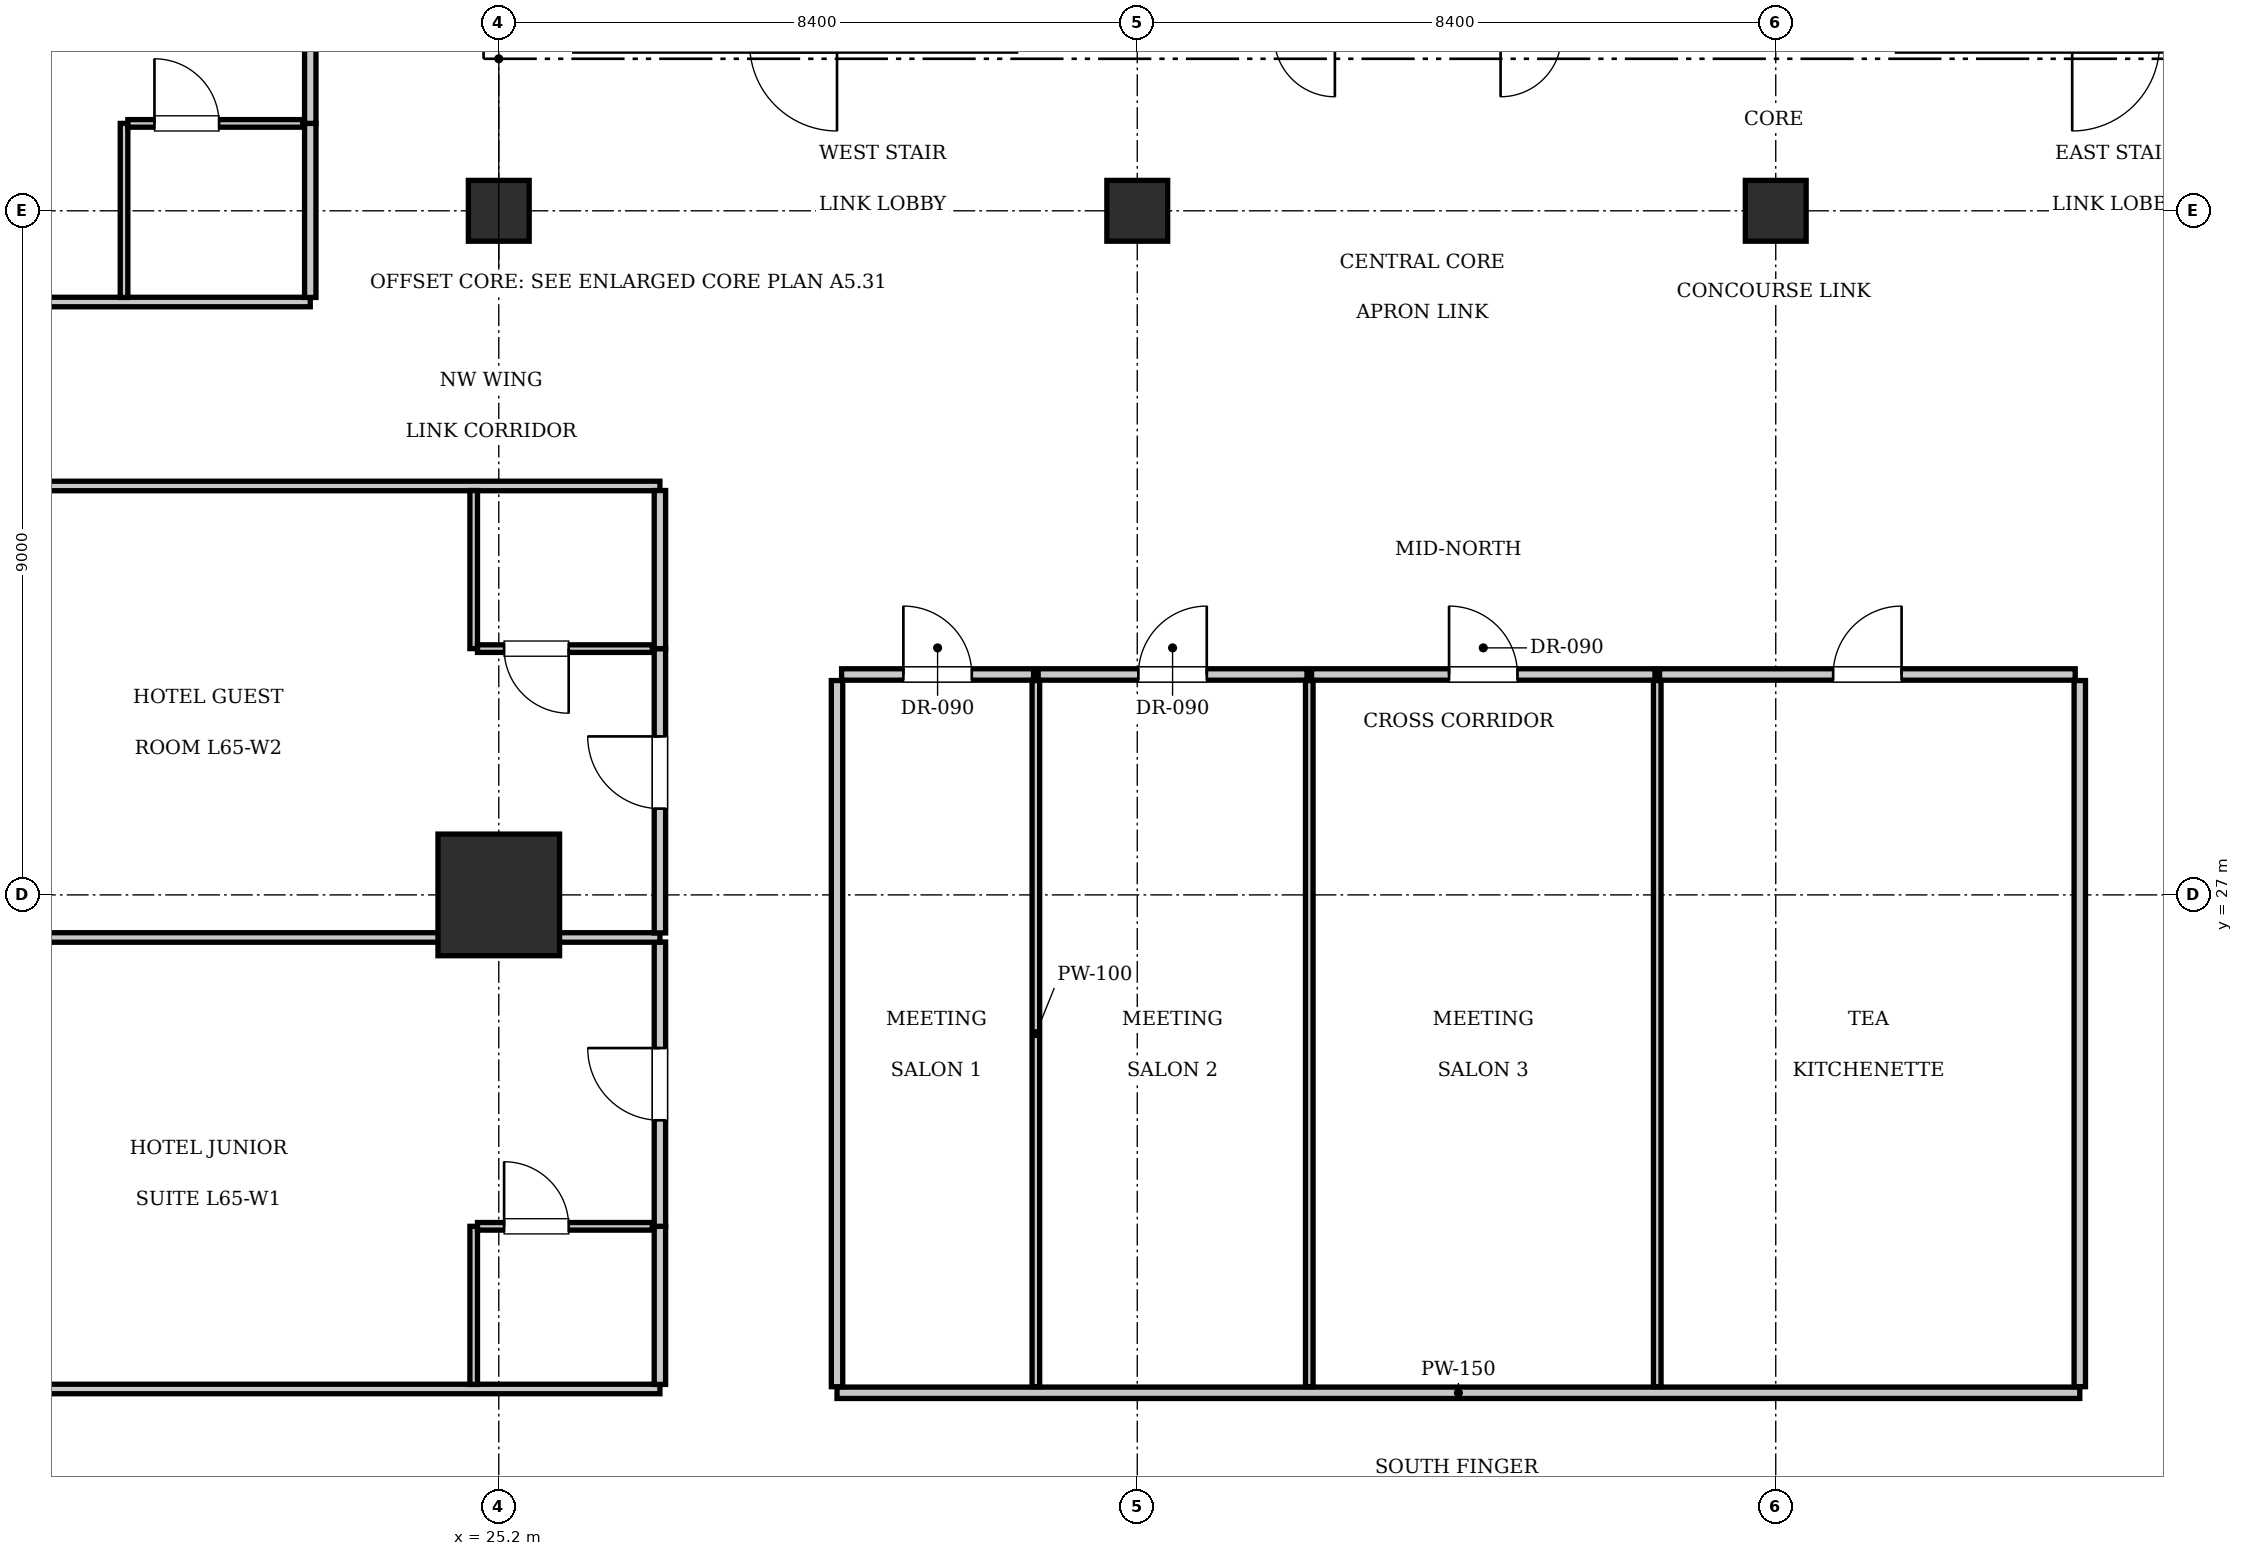
"""IFC4 building model, lengths in metres.
Left out: names, types, materials, properties, quantities, classifications, styles, units other than length and angle.
Written with IfcOpenShell. Run it as: python <this file> out.ifc"""

import sys

from ifc_helpers import new_model, si_unit, direction, frame, frame_2d, origin, origin_2d, place, context, subcontext, project, spatial, rectangle, extrude, element, fill, save


model = new_model("IFC4")
c1 = context("Model", 3, precision=1e-05, world=origin(), true_north=direction((0.0, 1.0)))
c2 = subcontext(c1, "Body", "Model", "MODEL_VIEW")
j1 = project(units=[si_unit("LENGTHUNIT", "METRE"), si_unit("PLANEANGLEUNIT", "RADIAN")], contexts=[c1])
p1 = place(None, origin())
s1 = spatial("IfcSite", under=j1, at=p1, CompositionType="ELEMENT")
p2 = place(p1, origin())
s2 = spatial("IfcBuilding", under=s1, at=p2, CompositionType="ELEMENT")
p3 = place(p2, frame((0.0, 0.0, 266.35)))
s3 = spatial("IfcBuildingStorey", under=s2, at=p3, CompositionType="ELEMENT", Elevation=266.35)
p4 = place(p3, frame((25.2, 27.0, 0.0), z_axis=(0.0, 0.0, 1.0), x_axis=(1.0, 0.0, 0.0)))
e1 = element("IfcColumn", 1, at=p4, inside=s3, PredefinedType="COLUMN", context=c2, shape_type="SweptSolid", body=[
    extrude(rectangle(XDim=1.6, YDim=1.6, at=origin_2d()), origin(), (0.0, 0.0, 1.0), 3.85),
])
for number, where, z_axis, x_axis in (
    (2, (25.2, 36.0, 0.0), (0.0, 0.0, 1.0), (1.0, 0.0, 0.0)),
    (3, (33.6, 36.0, 0.0), (0.0, 0.0, 1.0), (1.0, 0.0, 0.0)),
    (4, (42.0, 36.0, 0.0), (0.0, 0.0, 1.0), (1.0, 0.0, 0.0)),
):
    element("IfcColumn", number, at=place(p3, frame(where, z_axis=z_axis, x_axis=x_axis)), inside=s3, PredefinedType="COLUMN", context=c2, shape_type="SweptSolid", body=[
        extrude(rectangle(XDim=0.8, YDim=0.8, at=origin_2d()), origin(), (0.0, 0.0, 1.0), 3.85),
    ])
p5 = place(p3, frame((29.65, 20.45, 0.0), z_axis=(0.0, 0.0, 1.0), x_axis=(1.0, 0.0, 0.0)))
e5 = element("IfcWall", 5, at=p5, inside=s3, PredefinedType="PARTITIONING", context=c2, shape_type="SweptSolid", body=[
    extrude(rectangle(XDim=16.35, YDim=0.15, at=frame_2d((8.175, 0.0))), origin(), (0.0, 0.0, 1.0), 3.61),
])
for number, where, z_axis, x_axis in (
    (6, (29.65, 20.53, 0.0), (0.0, 0.0, 1.0), (0.0, 1.0, 0.0)),
    (7, (46.0, 20.53, 0.0), (0.0, 0.0, 1.0), (0.0, 1.0, 0.0)),
):
    element("IfcWall", number, at=place(p3, frame(where, z_axis=z_axis, x_axis=x_axis)), inside=s3, PredefinedType="PARTITIONING", context=c2, shape_type="SweptSolid", body=[
        extrude(rectangle(XDim=9.29, YDim=0.15, at=frame_2d((4.645, 0.0))), origin(), (0.0, 0.0, 1.0), 3.61),
    ])
p6 = place(p3, frame((29.71, 29.9, 0.0), z_axis=(0.0, 0.0, 1.0), x_axis=(1.0, 0.0, 0.0)))
e8 = element("IfcWall", 8, at=p6, inside=s3, PredefinedType="PARTITIONING", context=c2, shape_type="SweptSolid", body=[
    extrude(rectangle(XDim=2.526, YDim=0.15, at=frame_2d((1.263, 0.0))), origin(), (0.0, 0.0, 1.0), 3.61),
])
p7 = place(p6, frame((0.813, 0.0, 0.0)))
e9 = element("IfcOpeningElement", 9, at=p7, cuts=e8, PredefinedType="OPENING", context=c2, shape_type="SweptSolid", body=[
    extrude(rectangle(XDim=0.9, YDim=2.1, at=frame_2d((0.45, 1.05))), frame((0.0, 0.085, 0.0), z_axis=(0.0, -1.0, 0.0), x_axis=(1.0, 0.0, 0.0)), (0.0, 0.0, 1.0), 0.17),
])
p8 = place(p3, frame((32.266, 20.53, 0.0), z_axis=(0.0, 0.0, 1.0), x_axis=(0.0, 1.0, 0.0)))
e10 = element("IfcWall", 10, at=p8, inside=s3, PredefinedType="PARTITIONING", context=c2, shape_type="SweptSolid", body=[
    extrude(rectangle(XDim=9.29, YDim=0.1, at=frame_2d((4.645, 0.0))), origin(), (0.0, 0.0, 1.0), 3.61),
])
p9 = place(p3, frame((32.296, 29.9, 0.0), z_axis=(0.0, 0.0, 1.0), x_axis=(1.0, 0.0, 0.0)))
e11 = element("IfcWall", 11, at=p9, inside=s3, PredefinedType="PARTITIONING", context=c2, shape_type="SweptSolid", body=[
    extrude(rectangle(XDim=3.537, YDim=0.15, at=frame_2d((1.769, 0.0))), origin(), (0.0, 0.0, 1.0), 3.61),
])
p10 = place(p9, frame((1.319, 0.0, 0.0)))
e12 = element("IfcOpeningElement", 12, at=p10, cuts=e11, PredefinedType="OPENING", context=c2, shape_type="SweptSolid", body=[
    extrude(rectangle(XDim=0.9, YDim=2.1, at=frame_2d((0.45, 1.05))), frame((0.0, 0.085, 0.0), z_axis=(0.0, -1.0, 0.0), x_axis=(1.0, 0.0, 0.0)), (0.0, 0.0, 1.0), 0.17),
])
p11 = place(p3, frame((35.863, 20.53, 0.0), z_axis=(0.0, 0.0, 1.0), x_axis=(0.0, 1.0, 0.0)))
e13 = element("IfcWall", 13, at=p11, inside=s3, PredefinedType="PARTITIONING", context=c2, shape_type="SweptSolid", body=[
    extrude(rectangle(XDim=9.29, YDim=0.1, at=frame_2d((4.645, 0.0))), origin(), (0.0, 0.0, 1.0), 3.61),
])
p12 = place(p3, frame((35.893, 29.9, 0.0), z_axis=(0.0, 0.0, 1.0), x_axis=(1.0, 0.0, 0.0)))
e14 = element("IfcWall", 14, at=p12, inside=s3, PredefinedType="PARTITIONING", context=c2, shape_type="SweptSolid", body=[
    extrude(rectangle(XDim=4.518, YDim=0.15, at=frame_2d((2.259, 0.0))), origin(), (0.0, 0.0, 1.0), 3.61),
])
p13 = place(p12, frame((1.809, 0.0, 0.0)))
e15 = element("IfcOpeningElement", 15, at=p13, cuts=e14, PredefinedType="OPENING", context=c2, shape_type="SweptSolid", body=[
    extrude(rectangle(XDim=0.9, YDim=2.1, at=frame_2d((0.45, 1.05))), frame((0.0, 0.085, 0.0), z_axis=(0.0, -1.0, 0.0), x_axis=(1.0, 0.0, 0.0)), (0.0, 0.0, 1.0), 0.17),
])
p14 = place(p3, frame((40.441, 20.53, 0.0), z_axis=(0.0, 0.0, 1.0), x_axis=(0.0, 1.0, 0.0)))
e16 = element("IfcWall", 16, at=p14, inside=s3, PredefinedType="PARTITIONING", context=c2, shape_type="SweptSolid", body=[
    extrude(rectangle(XDim=9.29, YDim=0.1, at=frame_2d((4.645, 0.0))), origin(), (0.0, 0.0, 1.0), 3.61),
])
p15 = place(p3, frame((40.471, 29.9, 0.0), z_axis=(0.0, 0.0, 1.0), x_axis=(1.0, 0.0, 0.0)))
e17 = element("IfcWall", 17, at=p15, inside=s3, PredefinedType="PARTITIONING", context=c2, shape_type="SweptSolid", body=[
    extrude(rectangle(XDim=5.469, YDim=0.15, at=frame_2d((2.734, 0.0))), origin(), (0.0, 0.0, 1.0), 3.61),
])
p16 = place(p15, frame((2.284, 0.0, 0.0)))
e18 = element("IfcOpeningElement", 18, at=p16, cuts=e17, PredefinedType="OPENING", context=c2, shape_type="SweptSolid", body=[
    extrude(rectangle(XDim=0.9, YDim=2.1, at=frame_2d((0.45, 1.05))), frame((0.0, 0.085, 0.0), z_axis=(0.0, -1.0, 0.0), x_axis=(1.0, 0.0, 0.0)), (0.0, 0.0, 1.0), 0.17),
])
for number, where, z_axis, x_axis in (
    (19, (15.5, 20.5, 0.0), (0.0, 0.0, 1.0), (1.0, 0.0, 0.0)),
    (20, (15.5, 32.38, 0.0), (0.0, 0.0, 1.0), (1.0, 0.0, 0.0)),
):
    element("IfcWall", number, at=place(p3, frame(where, z_axis=z_axis, x_axis=x_axis)), inside=s3, PredefinedType="PARTITIONING", context=c2, shape_type="SweptSolid", body=[
        extrude(rectangle(XDim=11.82, YDim=0.125, at=frame_2d((5.91, 0.0))), origin(), (0.0, 0.0, 1.0), 3.61),
    ])
p17 = place(p3, frame((27.32, 20.56, 0.0), z_axis=(0.0, 0.0, 1.0), x_axis=(0.0, 1.0, 0.0)))
e21 = element("IfcWall", 21, at=p17, inside=s3, PredefinedType="PARTITIONING", context=c2, shape_type="SweptSolid", body=[
    extrude(rectangle(XDim=2.08, YDim=0.15, at=frame_2d((1.04, 0.0))), origin(), (0.0, 0.0, 1.0), 3.61),
])
p18 = place(p3, frame((27.32, 22.64, 0.0), z_axis=(0.0, 0.0, 1.0), x_axis=(0.0, 1.0, 0.0)))
e22 = element("IfcWall", 22, at=p18, inside=s3, PredefinedType="PARTITIONING", context=c2, shape_type="SweptSolid", body=[
    extrude(rectangle(XDim=3.74, YDim=0.15, at=frame_2d((1.87, 0.0))), origin(), (0.0, 0.0, 1.0), 3.61),
])
p19 = place(p18, frame((1.395, 0.0, 0.0)))
e23 = element("IfcOpeningElement", 23, at=p19, cuts=e22, PredefinedType="OPENING", context=c2, shape_type="SweptSolid", body=[
    extrude(rectangle(XDim=0.95, YDim=2.15, at=frame_2d((0.475, 1.075))), frame((0.0, 0.085, 0.0), z_axis=(0.0, -1.0, 0.0), x_axis=(1.0, 0.0, 0.0)), (0.0, 0.0, 1.0), 0.17),
])
p20 = place(p3, frame((24.87, 20.56, 0.0), z_axis=(0.0, 0.0, 1.0), x_axis=(0.0, 1.0, 0.0)))
e24 = element("IfcWall", 24, at=p20, inside=s3, PredefinedType="PARTITIONING", context=c2, shape_type="SweptSolid", body=[
    extrude(rectangle(XDim=2.08, YDim=0.1, at=frame_2d((1.04, 0.0))), origin(), (0.0, 0.0, 1.0), 3.61),
])
p21 = place(p3, frame((24.92, 22.64, 0.0), z_axis=(0.0, 0.0, 1.0), x_axis=(1.0, 0.0, 0.0)))
e25 = element("IfcWall", 25, at=p21, inside=s3, PredefinedType="PARTITIONING", context=c2, shape_type="SweptSolid", body=[
    extrude(rectangle(XDim=2.3, YDim=0.1, at=frame_2d((1.15, 0.0))), origin(), (0.0, 0.0, 1.0), 3.61),
])
p22 = place(p21, frame((0.35, 0.0, 0.0)))
e26 = element("IfcOpeningElement", 26, at=p22, cuts=e25, PredefinedType="OPENING", context=c2, shape_type="SweptSolid", body=[
    extrude(rectangle(XDim=0.85, YDim=2.1, at=frame_2d((0.425, 1.05))), frame((0.0, 0.06, 0.0), z_axis=(0.0, -1.0, 0.0), x_axis=(1.0, 0.0, 0.0)), (0.0, 0.0, 1.0), 0.12),
])
p23 = place(p3, frame((15.5, 26.44, 0.0), z_axis=(0.0, 0.0, 1.0), x_axis=(1.0, 0.0, 0.0)))
e27 = element("IfcWall", 27, at=p23, inside=s3, PredefinedType="PARTITIONING", context=c2, shape_type="SweptSolid", body=[
    extrude(rectangle(XDim=11.82, YDim=0.125, at=frame_2d((5.91, 0.0))), origin(), (0.0, 0.0, 1.0), 3.61),
])
p24 = place(p3, frame((27.32, 26.5, 0.0), z_axis=(0.0, 0.0, 1.0), x_axis=(0.0, 1.0, 0.0)))
e28 = element("IfcWall", 28, at=p24, inside=s3, PredefinedType="PARTITIONING", context=c2, shape_type="SweptSolid", body=[
    extrude(rectangle(XDim=3.74, YDim=0.15, at=frame_2d((1.87, 0.0))), origin(), (0.0, 0.0, 1.0), 3.61),
])
p25 = place(p24, frame((1.635, 0.0, 0.0)))
e29 = element("IfcOpeningElement", 29, at=p25, cuts=e28, PredefinedType="OPENING", context=c2, shape_type="SweptSolid", body=[
    extrude(rectangle(XDim=0.95, YDim=2.15, at=frame_2d((0.475, 1.075))), frame((0.0, 0.085, 0.0), z_axis=(0.0, -1.0, 0.0), x_axis=(1.0, 0.0, 0.0)), (0.0, 0.0, 1.0), 0.17),
])
p26 = place(p3, frame((27.32, 30.24, 0.0), z_axis=(0.0, 0.0, 1.0), x_axis=(0.0, 1.0, 0.0)))
e30 = element("IfcWall", 30, at=p26, inside=s3, PredefinedType="PARTITIONING", context=c2, shape_type="SweptSolid", body=[
    extrude(rectangle(XDim=2.08, YDim=0.15, at=frame_2d((1.04, 0.0))), origin(), (0.0, 0.0, 1.0), 3.61),
])
p27 = place(p3, frame((24.87, 30.24, 0.0), z_axis=(0.0, 0.0, 1.0), x_axis=(0.0, 1.0, 0.0)))
e31 = element("IfcWall", 31, at=p27, inside=s3, PredefinedType="PARTITIONING", context=c2, shape_type="SweptSolid", body=[
    extrude(rectangle(XDim=2.08, YDim=0.1, at=frame_2d((1.04, 0.0))), origin(), (0.0, 0.0, 1.0), 3.61),
])
p28 = place(p3, frame((24.92, 30.24, 0.0), z_axis=(0.0, 0.0, 1.0), x_axis=(1.0, 0.0, 0.0)))
e32 = element("IfcWall", 32, at=p28, inside=s3, PredefinedType="PARTITIONING", context=c2, shape_type="SweptSolid", body=[
    extrude(rectangle(XDim=2.3, YDim=0.1, at=frame_2d((1.15, 0.0))), origin(), (0.0, 0.0, 1.0), 3.61),
])
p29 = place(p28, frame((0.35, 0.0, 0.0)))
e33 = element("IfcOpeningElement", 33, at=p29, cuts=e32, PredefinedType="OPENING", context=c2, shape_type="SweptSolid", body=[
    extrude(rectangle(XDim=0.85, YDim=2.1, at=frame_2d((0.425, 1.05))), frame((0.0, 0.06, 0.0), z_axis=(0.0, -1.0, 0.0), x_axis=(1.0, 0.0, 0.0)), (0.0, 0.0, 1.0), 0.12),
])
p30 = place(p3, frame((15.5, 34.8, 0.0), z_axis=(0.0, 0.0, 1.0), x_axis=(1.0, 0.0, 0.0)))
e34 = element("IfcWall", 34, at=p30, inside=s3, PredefinedType="PARTITIONING", context=c2, shape_type="SweptSolid", body=[
    extrude(rectangle(XDim=7.22, YDim=0.125, at=frame_2d((3.61, 0.0))), origin(), (0.0, 0.0, 1.0), 3.61),
])
p31 = place(p3, frame((22.72, 34.86, 0.0), z_axis=(0.0, 0.0, 1.0), x_axis=(0.0, 1.0, 0.0)))
e35 = element("IfcWall", 35, at=p31, inside=s3, PredefinedType="PARTITIONING", context=c2, shape_type="SweptSolid", body=[
    extrude(rectangle(XDim=2.29, YDim=0.15, at=frame_2d((1.145, 0.0))), origin(), (0.0, 0.0, 1.0), 3.61),
])
p32 = place(p3, frame((22.72, 37.15, 0.0), z_axis=(0.0, 0.0, 1.0), x_axis=(0.0, 1.0, 0.0)))
e36 = element("IfcWall", 36, at=p32, inside=s3, PredefinedType="PARTITIONING", context=c2, shape_type="SweptSolid", body=[
    extrude(rectangle(XDim=4.559, YDim=0.15, at=frame_2d((2.279, 0.0))), origin(), (0.0, 0.0, 1.0), 3.61),
])
p33 = place(p32, frame((1.804, 0.0, 0.0)))
e37 = element("IfcOpeningElement", 37, at=p33, cuts=e36, PredefinedType="OPENING", context=c2, shape_type="SweptSolid", body=[
    extrude(rectangle(XDim=0.95, YDim=2.15, at=frame_2d((0.475, 1.075))), frame((0.0, 0.085, 0.0), z_axis=(0.0, -1.0, 0.0), x_axis=(1.0, 0.0, 0.0)), (0.0, 0.0, 1.0), 0.17),
])
p34 = place(p3, frame((20.27, 34.86, 0.0), z_axis=(0.0, 0.0, 1.0), x_axis=(0.0, 1.0, 0.0)))
e38 = element("IfcWall", 38, at=p34, inside=s3, PredefinedType="PARTITIONING", context=c2, shape_type="SweptSolid", body=[
    extrude(rectangle(XDim=2.29, YDim=0.1, at=frame_2d((1.145, 0.0))), origin(), (0.0, 0.0, 1.0), 3.61),
])
p35 = place(p3, frame((20.32, 37.15, 0.0), z_axis=(0.0, 0.0, 1.0), x_axis=(1.0, 0.0, 0.0)))
e39 = element("IfcWall", 39, at=p35, inside=s3, PredefinedType="PARTITIONING", context=c2, shape_type="SweptSolid", body=[
    extrude(rectangle(XDim=2.3, YDim=0.1, at=frame_2d((1.15, 0.0))), origin(), (0.0, 0.0, 1.0), 3.61),
])
p36 = place(p35, frame((0.35, 0.0, 0.0)))
e40 = element("IfcOpeningElement", 40, at=p36, cuts=e39, PredefinedType="OPENING", context=c2, shape_type="SweptSolid", body=[
    extrude(rectangle(XDim=0.85, YDim=2.1, at=frame_2d((0.425, 1.05))), frame((0.0, 0.06, 0.0), z_axis=(0.0, -1.0, 0.0), x_axis=(1.0, 0.0, 0.0)), (0.0, 0.0, 1.0), 0.12),
])
p37 = place(p7, origin())
e41 = element("IfcDoor", 41, at=p37, inside=s3, OperationType="SINGLE_SWING_LEFT", PredefinedType="DOOR", context=c2, shape_type="SweptSolid", body=[
    extrude(rectangle(XDim=0.9, YDim=2.1, at=frame_2d((0.45, 1.05))), frame((0.0, 0.025, 0.0), z_axis=(0.0, -1.0, 0.0), x_axis=(1.0, 0.0, 0.0)), (0.0, 0.0, 1.0), 0.05),
])
fill(e9, e41)
p38 = place(p10, origin())
e42 = element("IfcDoor", 42, at=p38, inside=s3, OperationType="SINGLE_SWING_RIGHT", PredefinedType="DOOR", context=c2, shape_type="SweptSolid", body=[
    extrude(rectangle(XDim=0.9, YDim=2.1, at=frame_2d((0.45, 1.05))), frame((0.0, 0.025, 0.0), z_axis=(0.0, -1.0, 0.0), x_axis=(1.0, 0.0, 0.0)), (0.0, 0.0, 1.0), 0.05),
])
fill(e12, e42)
p39 = place(p13, origin())
e43 = element("IfcDoor", 43, at=p39, inside=s3, OperationType="SINGLE_SWING_LEFT", PredefinedType="DOOR", context=c2, shape_type="SweptSolid", body=[
    extrude(rectangle(XDim=0.9, YDim=2.1, at=frame_2d((0.45, 1.05))), frame((0.0, 0.025, 0.0), z_axis=(0.0, -1.0, 0.0), x_axis=(1.0, 0.0, 0.0)), (0.0, 0.0, 1.0), 0.05),
])
fill(e15, e43)
p40 = place(p16, origin())
e44 = element("IfcDoor", 44, at=p40, inside=s3, OperationType="SINGLE_SWING_RIGHT", PredefinedType="DOOR", context=c2, shape_type="SweptSolid", body=[
    extrude(rectangle(XDim=0.9, YDim=2.1, at=frame_2d((0.45, 1.05))), frame((0.0, 0.025, 0.0), z_axis=(0.0, -1.0, 0.0), x_axis=(1.0, 0.0, 0.0)), (0.0, 0.0, 1.0), 0.05),
])
fill(e18, e44)
p41 = place(p22, origin())
e45 = element("IfcDoor", 45, at=p41, inside=s3, OperationType="SINGLE_SWING_LEFT", PredefinedType="DOOR", context=c2, shape_type="SweptSolid", body=[
    extrude(rectangle(XDim=0.85, YDim=2.1, at=frame_2d((0.425, 1.05))), frame((0.0, 0.025, 0.0), z_axis=(0.0, -1.0, 0.0), x_axis=(1.0, 0.0, 0.0)), (0.0, 0.0, 1.0), 0.05),
])
fill(e26, e45)
p42 = place(p19, origin())
e46 = element("IfcDoor", 46, at=p42, inside=s3, OperationType="SINGLE_SWING_RIGHT", PredefinedType="DOOR", context=c2, shape_type="SweptSolid", body=[
    extrude(rectangle(XDim=0.95, YDim=2.15, at=frame_2d((0.475, 1.075))), frame((0.0, 0.025, 0.0), z_axis=(0.0, -1.0, 0.0), x_axis=(1.0, 0.0, 0.0)), (0.0, 0.0, 1.0), 0.05),
])
fill(e23, e46)
p43 = place(p29, frame((0.85, 0.0, 0.0), z_axis=(0.0, 0.0, 1.0), x_axis=(-1.0, 0.0, 0.0)))
e47 = element("IfcDoor", 47, at=p43, inside=s3, OperationType="SINGLE_SWING_LEFT", PredefinedType="DOOR", context=c2, shape_type="SweptSolid", body=[
    extrude(rectangle(XDim=0.85, YDim=2.1, at=frame_2d((0.425, 1.05))), frame((0.0, 0.025, 0.0), z_axis=(0.0, -1.0, 0.0), x_axis=(1.0, 0.0, 0.0)), (0.0, 0.0, 1.0), 0.05),
])
fill(e33, e47)
p44 = place(p25, origin())
e48 = element("IfcDoor", 48, at=p44, inside=s3, OperationType="SINGLE_SWING_RIGHT", PredefinedType="DOOR", context=c2, shape_type="SweptSolid", body=[
    extrude(rectangle(XDim=0.95, YDim=2.15, at=frame_2d((0.475, 1.075))), frame((0.0, 0.025, 0.0), z_axis=(0.0, -1.0, 0.0), x_axis=(1.0, 0.0, 0.0)), (0.0, 0.0, 1.0), 0.05),
])
fill(e29, e48)
p45 = place(p36, origin())
e49 = element("IfcDoor", 49, at=p45, inside=s3, OperationType="SINGLE_SWING_LEFT", PredefinedType="DOOR", context=c2, shape_type="SweptSolid", body=[
    extrude(rectangle(XDim=0.85, YDim=2.1, at=frame_2d((0.425, 1.05))), frame((0.0, 0.025, 0.0), z_axis=(0.0, -1.0, 0.0), x_axis=(1.0, 0.0, 0.0)), (0.0, 0.0, 1.0), 0.05),
])
fill(e40, e49)
save(model, sys.argv[1])
